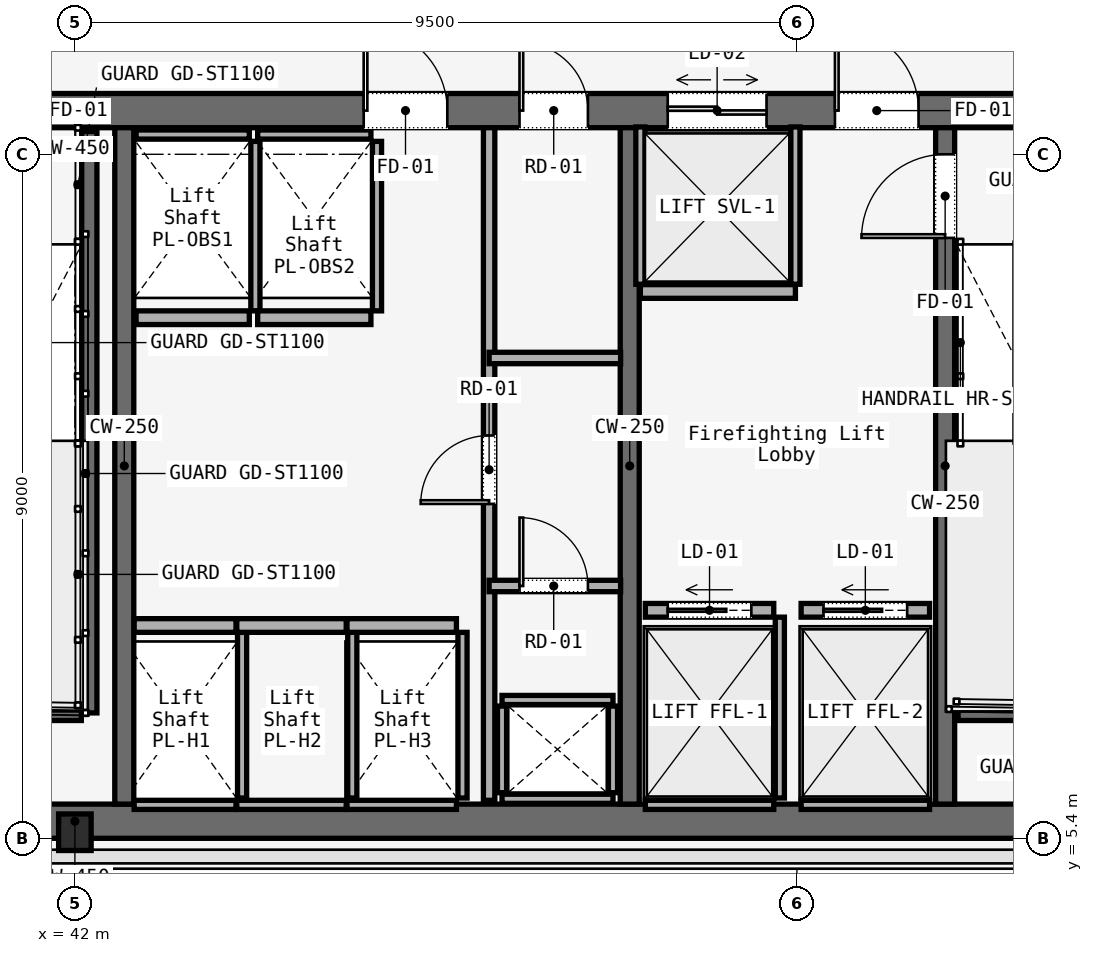
"""IFC4 building model, lengths in metres.
Left out: names, types, materials, properties, quantities, classifications, styles, units other than length and angle.
Written with IfcOpenShell. Run it as: python <this file> out.ifc"""

import sys

from ifc_helpers import new_model, si_unit, direction, frame, frame_2d, origin, origin_2d, place, context, subcontext, project, spatial, rectangle, i_section, extrude, element, fill, save


model = new_model("IFC4")
c1 = context("Model", 3, precision=1e-05, world=origin(), true_north=direction((0.0, 1.0)))
c2 = subcontext(c1, "Body", "Model", "MODEL_VIEW")
j1 = project(units=[si_unit("LENGTHUNIT", "METRE"), si_unit("PLANEANGLEUNIT", "RADIAN")], contexts=[c1])
p1 = place(None, origin())
s1 = spatial("IfcSite", under=j1, at=p1, CompositionType="ELEMENT")
p2 = place(p1, origin())
s2 = spatial("IfcBuilding", under=s1, at=p2, CompositionType="ELEMENT")
p3 = place(p2, frame((0.0, 0.0, 149.8)))
s3 = spatial("IfcBuildingStorey", under=s2, at=p3, CompositionType="ELEMENT", Elevation=149.8)
p4 = place(p3, frame((26.45, 14.975, 0.0), z_axis=(0.0, 0.0, 1.0), x_axis=(1.0, 0.0, 0.0)))
e1 = element("IfcWall", 1, at=p4, inside=s3, PredefinedType="SOLIDWALL", context=c2, shape_type="SweptSolid", body=[
    extrude(rectangle(XDim=31.1, YDim=0.45, at=frame_2d((15.55, 0.0))), origin(), (0.0, 0.0, 1.0), 3.58),
])
p5 = place(p4, frame((1.65, 0.0, 0.0)))
e2 = element("IfcOpeningElement", 2, at=p5, cuts=e1, PredefinedType="OPENING", context=c2, shape_type="SweptSolid", body=[
    extrude(rectangle(XDim=1.1, YDim=2.2, at=frame_2d((0.55, 1.1))), frame((0.0, 0.225, 0.0), z_axis=(0.0, -1.0, 0.0), x_axis=(1.0, 0.0, 0.0)), (0.0, 0.0, 1.0), 0.45),
])
p6 = place(p4, frame((13.65, 0.0, 0.0)))
e3 = element("IfcOpeningElement", 3, at=p6, cuts=e1, PredefinedType="OPENING", context=c2, shape_type="SweptSolid", body=[
    extrude(rectangle(XDim=1.1, YDim=2.2, at=frame_2d((0.55, 1.1))), frame((0.0, 0.225, 0.0), z_axis=(0.0, -1.0, 0.0), x_axis=(1.0, 0.0, 0.0)), (0.0, 0.0, 1.0), 0.45),
])
p7 = place(p4, frame((25.55, 0.0, 0.0)))
e4 = element("IfcOpeningElement", 4, at=p7, cuts=e1, PredefinedType="OPENING", context=c2, shape_type="SweptSolid", body=[
    extrude(rectangle(XDim=1.1, YDim=2.2, at=frame_2d((0.55, 1.1))), frame((0.0, 0.225, 0.0), z_axis=(0.0, -1.0, 0.0), x_axis=(1.0, 0.0, 0.0)), (0.0, 0.0, 1.0), 0.45),
])
p8 = place(p4, frame((10.7, 0.0, 0.0)))
e5 = element("IfcOpeningElement", 5, at=p8, cuts=e1, PredefinedType="OPENING", context=c2, shape_type="SweptSolid", body=[
    extrude(rectangle(XDim=1.4, YDim=2.2, at=frame_2d((0.7, 1.1))), frame((0.0, 0.225, 0.0), z_axis=(0.0, -1.0, 0.0), x_axis=(1.0, 0.0, 0.0)), (0.0, 0.0, 1.0), 0.45),
])
p9 = place(p4, frame((19.35, 0.0, 0.0)))
e6 = element("IfcOpeningElement", 6, at=p9, cuts=e1, PredefinedType="OPENING", context=c2, shape_type="SweptSolid", body=[
    extrude(rectangle(XDim=1.1, YDim=2.2, at=frame_2d((0.55, 1.1))), frame((0.0, 0.225, 0.0), z_axis=(0.0, -1.0, 0.0), x_axis=(1.0, 0.0, 0.0)), (0.0, 0.0, 1.0), 0.45),
])
p10 = place(p4, frame((21.4, 0.0, 0.0)))
e7 = element("IfcOpeningElement", 7, at=p10, cuts=e1, PredefinedType="OPENING", context=c2, shape_type="SweptSolid", body=[
    extrude(rectangle(XDim=0.9, YDim=2.1, at=frame_2d((0.45, 1.05))), frame((0.0, 0.225, 0.0), z_axis=(0.0, -1.0, 0.0), x_axis=(1.0, 0.0, 0.0)), (0.0, 0.0, 1.0), 0.45),
])
p11 = place(p4, frame((23.35, 0.0, 0.0)))
e8 = element("IfcOpeningElement", 8, at=p11, cuts=e1, PredefinedType="OPENING", context=c2, shape_type="SweptSolid", body=[
    extrude(rectangle(XDim=1.3, YDim=2.3, at=frame_2d((0.65, 1.15))), frame((0.0, 0.225, 0.0), z_axis=(0.0, -1.0, 0.0), x_axis=(1.0, 0.0, 0.0)), (0.0, 0.0, 1.0), 0.45),
])
p12 = place(p3, frame((26.45, 5.625, 0.0), z_axis=(0.0, 0.0, 1.0), x_axis=(1.0, 0.0, 0.0)))
e9 = element("IfcWall", 9, at=p12, inside=s3, PredefinedType="SOLIDWALL", context=c2, shape_type="SweptSolid", body=[
    extrude(rectangle(XDim=31.1, YDim=0.45, at=frame_2d((15.55, 0.0))), origin(), (0.0, 0.0, 1.0), 3.58),
])
for number, where, z_axis, x_axis in (
    (10, (42.65, 5.85, 0.0), (0.0, 0.0, 1.0), (0.0, 1.0, 0.0)),
    (11, (49.3, 5.85, 0.0), (0.0, 0.0, 1.0), (0.0, 1.0, 0.0)),
):
    element("IfcWall", number, at=place(p3, frame(where, z_axis=z_axis, x_axis=x_axis)), inside=s3, PredefinedType="SOLIDWALL", context=c2, shape_type="SweptSolid", body=[
        extrude(rectangle(XDim=8.9, YDim=0.25, at=frame_2d((4.45, 0.0))), origin(), (0.0, 0.0, 1.0), 3.58),
    ])
p13 = place(p3, frame((53.45, 5.85, 0.0), z_axis=(0.0, 0.0, 1.0), x_axis=(0.0, 1.0, 0.0)))
e12 = element("IfcWall", 12, at=p13, inside=s3, PredefinedType="SOLIDWALL", context=c2, shape_type="SweptSolid", body=[
    extrude(rectangle(XDim=8.9, YDim=0.25, at=frame_2d((4.45, 0.0))), origin(), (0.0, 0.0, 1.0), 3.58),
])
p14 = place(p13, frame((7.45, 0.0, 0.0)))
e13 = element("IfcOpeningElement", 13, at=p14, cuts=e12, PredefinedType="OPENING", context=c2, shape_type="SweptSolid", body=[
    extrude(rectangle(XDim=1.1, YDim=2.2, at=frame_2d((0.55, 1.1))), frame((0.0, 0.125, 0.0), z_axis=(0.0, -1.0, 0.0), x_axis=(1.0, 0.0, 0.0)), (0.0, 0.0, 1.0), 0.25),
])
p15 = place(p3, frame((42.0, 5.48, 0.0), z_axis=(0.0, 0.0, 1.0), x_axis=(1.0, 0.0, 0.0)))
e14 = element("IfcColumn", 14, at=p15, inside=s3, PredefinedType="COLUMN", context=c2, shape_type="SweptSolid", body=[
    extrude(i_section(OverallWidth=0.428, OverallDepth=0.481, WebThickness=0.051, FlangeThickness=0.065, FilletRadius=0.015, at=origin_2d()), origin(), (0.0, 0.0, 1.0), 3.58),
])
p16 = place(p3, frame((42.19, 14.7, 0.0), z_axis=(0.0, 0.0, 1.0), x_axis=(0.0, -1.0, 0.0)))
e15 = element("IfcWall", 15, at=p16, inside=s3, PredefinedType="SOLIDWALL", context=c2, shape_type="SweptSolid", body=[
    extrude(rectangle(XDim=7.65, YDim=0.2, at=frame_2d((3.825, 0.0))), origin(), (0.0, 0.0, 1.0), 3.8),
])
for number, where, z_axis, x_axis in (
    (16, (38.97, 7.05, 0.0), (0.0, 0.0, 1.0), (1.0, 0.0, 0.0)),
    (17, (53.62, 7.05, 0.0), (0.0, 0.0, 1.0), (1.0, 0.0, 0.0)),
):
    element("IfcWall", number, at=place(p3, frame(where, z_axis=z_axis, x_axis=x_axis)), inside=s3, PredefinedType="SOLIDWALL", context=c2, shape_type="SweptSolid", body=[
        extrude(rectangle(XDim=3.115, YDim=0.2, at=frame_2d((1.558, 0.0))), origin(), (0.0, 0.0, 1.0), 3.8),
    ])
for number, where, z_axis, x_axis in (
    (18, (47.62, 5.92, 0.0), (0.0, 0.0, 1.0), (1.0, 0.0, 0.0)),
    (19, (47.62, 7.22, 0.0), (0.0, 0.0, 1.0), (1.0, 0.0, 0.0)),
):
    element("IfcWall", number, at=place(p3, frame(where, z_axis=z_axis, x_axis=x_axis)), inside=s3, PredefinedType="SOLIDWALL", context=c2, shape_type="SweptSolid", body=[
        extrude(rectangle(XDim=1.46, YDim=0.12, at=frame_2d((0.73, 0.0))), origin(), (0.0, 0.0, 1.0), 3.01),
    ])
for number, where, z_axis, x_axis in (
    (20, (47.62, 6.0, 0.0), (0.0, 0.0, 1.0), (0.0, 1.0, 0.0)),
    (21, (49.08, 6.0, 0.0), (0.0, 0.0, 1.0), (0.0, 1.0, 0.0)),
):
    element("IfcWall", number, at=place(p3, frame(where, z_axis=z_axis, x_axis=x_axis)), inside=s3, PredefinedType="SOLIDWALL", context=c2, shape_type="SweptSolid", body=[
        extrude(rectangle(XDim=1.14, YDim=0.12, at=frame_2d((0.57, 0.0))), origin(), (0.0, 0.0, 1.0), 3.01),
    ])
p17 = place(p3, frame((47.45, 5.9, 0.0), z_axis=(0.0, 0.0, 1.0), x_axis=(0.0, 1.0, 0.0)))
e22 = element("IfcWall", 22, at=p17, inside=s3, PredefinedType="PARTITIONING", context=c2, shape_type="SweptSolid", body=[
    extrude(rectangle(XDim=8.85, YDim=0.15, at=frame_2d((4.425, 0.0))), origin(), (0.0, 0.0, 1.0), 3.01),
])
p18 = place(p17, frame((3.9, 0.0, 0.0)))
e23 = element("IfcOpeningElement", 23, at=p18, cuts=e22, PredefinedType="OPENING", context=c2, shape_type="SweptSolid", body=[
    extrude(rectangle(XDim=0.9, YDim=2.1, at=frame_2d((0.45, 1.05))), frame((0.0, 0.075, 0.0), z_axis=(0.0, -1.0, 0.0), x_axis=(1.0, 0.0, 0.0)), (0.0, 0.0, 1.0), 0.15),
])
p19 = place(p3, frame((47.45, 8.72, 0.0), z_axis=(0.0, 0.0, 1.0), x_axis=(1.0, 0.0, 0.0)))
e24 = element("IfcWall", 24, at=p19, inside=s3, PredefinedType="PARTITIONING", context=c2, shape_type="SweptSolid", body=[
    extrude(rectangle(XDim=1.73, YDim=0.15, at=frame_2d((0.865, 0.0))), origin(), (0.0, 0.0, 1.0), 3.01),
])
p20 = place(p19, frame((0.4, 0.0, 0.0)))
e25 = element("IfcOpeningElement", 25, at=p20, cuts=e24, PredefinedType="OPENING", context=c2, shape_type="SweptSolid", body=[
    extrude(rectangle(XDim=0.9, YDim=2.1, at=frame_2d((0.45, 1.05))), frame((0.0, 0.075, 0.0), z_axis=(0.0, -1.0, 0.0), x_axis=(1.0, 0.0, 0.0)), (0.0, 0.0, 1.0), 0.15),
])
p21 = place(p3, frame((47.45, 11.72, 0.0), z_axis=(0.0, 0.0, 1.0), x_axis=(1.0, 0.0, 0.0)))
e26 = element("IfcWall", 26, at=p21, inside=s3, PredefinedType="PARTITIONING", context=c2, shape_type="SweptSolid", body=[
    extrude(rectangle(XDim=1.73, YDim=0.15, at=frame_2d((0.865, 0.0))), origin(), (0.0, 0.0, 1.0), 3.01),
])
p22 = place(p3, frame((42.78, 8.2, 0.0), z_axis=(0.0, 0.0, 1.0), x_axis=(1.0, 0.0, 0.0)))
e27 = element("IfcWall", 27, at=p22, inside=s3, PredefinedType="SOLIDWALL", context=c2, shape_type="SweptSolid", body=[
    extrude(rectangle(XDim=1.34, YDim=0.18, at=frame_2d((0.67, 0.0))), origin(), (0.0, 0.0, 1.0), 3.01),
])
p23 = place(p3, frame((42.78, 5.84, 0.0), z_axis=(0.0, 0.0, 1.0), x_axis=(1.0, 0.0, 0.0)))
e28 = element("IfcWall", 28, at=p23, inside=s3, PredefinedType="SOLIDWALL", context=c2, shape_type="SweptSolid", body=[
    extrude(rectangle(XDim=1.34, YDim=0.12, at=frame_2d((0.67, 0.0))), origin(), (0.0, 0.0, 1.0), 3.01),
])
p24 = place(p3, frame((44.2, 5.93, 0.0), z_axis=(0.0, 0.0, 1.0), x_axis=(0.0, 1.0, 0.0)))
e29 = element("IfcWall", 29, at=p24, inside=s3, PredefinedType="SOLIDWALL", context=c2, shape_type="SweptSolid", body=[
    extrude(rectangle(XDim=2.18, YDim=0.12, at=frame_2d((1.09, 0.0))), origin(), (0.0, 0.0, 1.0), 3.01),
])
p25 = place(p3, frame((44.13, 8.2, 0.0), z_axis=(0.0, 0.0, 1.0), x_axis=(1.0, 0.0, 0.0)))
e30 = element("IfcWall", 30, at=p25, inside=s3, PredefinedType="SOLIDWALL", context=c2, shape_type="SweptSolid", body=[
    extrude(rectangle(XDim=1.44, YDim=0.18, at=frame_2d((0.72, 0.0))), origin(), (0.0, 0.0, 1.0), 3.01),
])
p26 = place(p3, frame((44.13, 5.84, 0.0), z_axis=(0.0, 0.0, 1.0), x_axis=(1.0, 0.0, 0.0)))
e31 = element("IfcWall", 31, at=p26, inside=s3, PredefinedType="SOLIDWALL", context=c2, shape_type="SweptSolid", body=[
    extrude(rectangle(XDim=1.44, YDim=0.12, at=frame_2d((0.72, 0.0))), origin(), (0.0, 0.0, 1.0), 3.01),
])
p27 = place(p3, frame((45.65, 5.93, 0.0), z_axis=(0.0, 0.0, 1.0), x_axis=(0.0, 1.0, 0.0)))
e32 = element("IfcWall", 32, at=p27, inside=s3, PredefinedType="SOLIDWALL", context=c2, shape_type="SweptSolid", body=[
    extrude(rectangle(XDim=2.18, YDim=0.12, at=frame_2d((1.09, 0.0))), origin(), (0.0, 0.0, 1.0), 3.01),
])
p28 = place(p3, frame((45.58, 8.2, 0.0), z_axis=(0.0, 0.0, 1.0), x_axis=(1.0, 0.0, 0.0)))
e33 = element("IfcWall", 33, at=p28, inside=s3, PredefinedType="SOLIDWALL", context=c2, shape_type="SweptSolid", body=[
    extrude(rectangle(XDim=1.44, YDim=0.18, at=frame_2d((0.72, 0.0))), origin(), (0.0, 0.0, 1.0), 3.01),
])
p29 = place(p3, frame((45.58, 5.84, 0.0), z_axis=(0.0, 0.0, 1.0), x_axis=(1.0, 0.0, 0.0)))
e34 = element("IfcWall", 34, at=p29, inside=s3, PredefinedType="SOLIDWALL", context=c2, shape_type="SweptSolid", body=[
    extrude(rectangle(XDim=1.44, YDim=0.12, at=frame_2d((0.72, 0.0))), origin(), (0.0, 0.0, 1.0), 3.01),
])
p30 = place(p3, frame((47.1, 5.93, 0.0), z_axis=(0.0, 0.0, 1.0), x_axis=(0.0, 1.0, 0.0)))
e35 = element("IfcWall", 35, at=p30, inside=s3, PredefinedType="SOLIDWALL", context=c2, shape_type="SweptSolid", body=[
    extrude(rectangle(XDim=2.18, YDim=0.12, at=frame_2d((1.09, 0.0))), origin(), (0.0, 0.0, 1.0), 3.01),
])
p31 = place(p3, frame((42.805, 12.25, 0.0), z_axis=(0.0, 0.0, 1.0), x_axis=(1.0, 0.0, 0.0)))
e36 = element("IfcWall", 36, at=p31, inside=s3, PredefinedType="SOLIDWALL", context=c2, shape_type="SweptSolid", body=[
    extrude(rectangle(XDim=1.49, YDim=0.18, at=frame_2d((0.745, 0.0))), origin(), (0.0, 0.0, 1.0), 3.01),
])
p32 = place(p3, frame((42.805, 14.66, 0.0), z_axis=(0.0, 0.0, 1.0), x_axis=(1.0, 0.0, 0.0)))
e37 = element("IfcWall", 37, at=p32, inside=s3, PredefinedType="SOLIDWALL", context=c2, shape_type="SweptSolid", body=[
    extrude(rectangle(XDim=1.49, YDim=0.12, at=frame_2d((0.745, 0.0))), origin(), (0.0, 0.0, 1.0), 3.01),
])
p33 = place(p3, frame((44.375, 12.34, 0.0), z_axis=(0.0, 0.0, 1.0), x_axis=(0.0, 1.0, 0.0)))
e38 = element("IfcWall", 38, at=p33, inside=s3, PredefinedType="SOLIDWALL", context=c2, shape_type="SweptSolid", body=[
    extrude(rectangle(XDim=2.23, YDim=0.12, at=frame_2d((1.115, 0.0))), origin(), (0.0, 0.0, 1.0), 3.01),
])
p34 = place(p3, frame((44.405, 12.25, 0.0), z_axis=(0.0, 0.0, 1.0), x_axis=(1.0, 0.0, 0.0)))
e39 = element("IfcWall", 39, at=p34, inside=s3, PredefinedType="SOLIDWALL", context=c2, shape_type="SweptSolid", body=[
    extrude(rectangle(XDim=1.49, YDim=0.18, at=frame_2d((0.745, 0.0))), origin(), (0.0, 0.0, 1.0), 3.01),
])
p35 = place(p3, frame((44.405, 14.66, 0.0), z_axis=(0.0, 0.0, 1.0), x_axis=(1.0, 0.0, 0.0)))
e40 = element("IfcWall", 40, at=p35, inside=s3, PredefinedType="SOLIDWALL", context=c2, shape_type="SweptSolid", body=[
    extrude(rectangle(XDim=1.49, YDim=0.12, at=frame_2d((0.745, 0.0))), origin(), (0.0, 0.0, 1.0), 3.01),
])
p36 = place(p3, frame((45.975, 12.34, 0.0), z_axis=(0.0, 0.0, 1.0), x_axis=(0.0, 1.0, 0.0)))
e41 = element("IfcWall", 41, at=p36, inside=s3, PredefinedType="SOLIDWALL", context=c2, shape_type="SweptSolid", body=[
    extrude(rectangle(XDim=2.23, YDim=0.12, at=frame_2d((1.115, 0.0))), origin(), (0.0, 0.0, 1.0), 3.01),
])
p37 = place(p3, frame((49.505, 8.4, 0.0), z_axis=(0.0, 0.0, 1.0), x_axis=(1.0, 0.0, 0.0)))
e42 = element("IfcWall", 42, at=p37, inside=s3, PredefinedType="SOLIDWALL", context=c2, shape_type="SweptSolid", body=[
    extrude(rectangle(XDim=1.69, YDim=0.18, at=frame_2d((0.845, 0.0))), origin(), (0.0, 0.0, 1.0), 3.01),
])
p38 = place(p37, frame((0.295, 0.0, 0.0)))
e43 = element("IfcOpeningElement", 43, at=p38, cuts=e42, PredefinedType="OPENING", context=c2, shape_type="SweptSolid", body=[
    extrude(rectangle(XDim=1.1, YDim=2.2, at=frame_2d((0.55, 1.1))), frame((0.0, 0.09, 0.0), z_axis=(0.0, -1.0, 0.0), x_axis=(1.0, 0.0, 0.0)), (0.0, 0.0, 1.0), 0.18),
])
p39 = place(p3, frame((49.505, 5.84, 0.0), z_axis=(0.0, 0.0, 1.0), x_axis=(1.0, 0.0, 0.0)))
e44 = element("IfcWall", 44, at=p39, inside=s3, PredefinedType="SOLIDWALL", context=c2, shape_type="SweptSolid", body=[
    extrude(rectangle(XDim=1.69, YDim=0.12, at=frame_2d((0.845, 0.0))), origin(), (0.0, 0.0, 1.0), 3.01),
])
p40 = place(p3, frame((51.275, 5.93, 0.0), z_axis=(0.0, 0.0, 1.0), x_axis=(0.0, 1.0, 0.0)))
e45 = element("IfcWall", 45, at=p40, inside=s3, PredefinedType="SOLIDWALL", context=c2, shape_type="SweptSolid", body=[
    extrude(rectangle(XDim=2.38, YDim=0.12, at=frame_2d((1.19, 0.0))), origin(), (0.0, 0.0, 1.0), 3.01),
])
p41 = place(p3, frame((51.555, 8.4, 0.0), z_axis=(0.0, 0.0, 1.0), x_axis=(1.0, 0.0, 0.0)))
e46 = element("IfcWall", 46, at=p41, inside=s3, PredefinedType="SOLIDWALL", context=c2, shape_type="SweptSolid", body=[
    extrude(rectangle(XDim=1.69, YDim=0.18, at=frame_2d((0.845, 0.0))), origin(), (0.0, 0.0, 1.0), 3.01),
])
p42 = place(p41, frame((0.295, 0.0, 0.0)))
e47 = element("IfcOpeningElement", 47, at=p42, cuts=e46, PredefinedType="OPENING", context=c2, shape_type="SweptSolid", body=[
    extrude(rectangle(XDim=1.1, YDim=2.2, at=frame_2d((0.55, 1.1))), frame((0.0, 0.09, 0.0), z_axis=(0.0, -1.0, 0.0), x_axis=(1.0, 0.0, 0.0)), (0.0, 0.0, 1.0), 0.18),
])
p43 = place(p3, frame((51.555, 5.84, 0.0), z_axis=(0.0, 0.0, 1.0), x_axis=(1.0, 0.0, 0.0)))
e48 = element("IfcWall", 48, at=p43, inside=s3, PredefinedType="SOLIDWALL", context=c2, shape_type="SweptSolid", body=[
    extrude(rectangle(XDim=1.69, YDim=0.12, at=frame_2d((0.845, 0.0))), origin(), (0.0, 0.0, 1.0), 3.01),
])
p44 = place(p3, frame((49.44, 12.595, 0.0), z_axis=(0.0, 0.0, 1.0), x_axis=(1.0, 0.0, 0.0)))
e49 = element("IfcWall", 49, at=p44, inside=s3, PredefinedType="SOLIDWALL", context=c2, shape_type="SweptSolid", body=[
    extrude(rectangle(XDim=2.04, YDim=0.18, at=frame_2d((1.02, 0.0))), origin(), (0.0, 0.0, 1.0), 3.01),
])
for number, where, z_axis, x_axis in (
    (50, (49.44, 12.69, 0.0), (0.0, 0.0, 1.0), (0.0, 1.0, 0.0)),
    (51, (51.48, 12.69, 0.0), (0.0, 0.0, 1.0), (0.0, 1.0, 0.0)),
):
    element("IfcWall", number, at=place(p3, frame(where, z_axis=z_axis, x_axis=x_axis)), inside=s3, PredefinedType="SOLIDWALL", context=c2, shape_type="SweptSolid", body=[
        extrude(rectangle(XDim=2.07, YDim=0.12, at=frame_2d((1.035, 0.0))), origin(), (0.0, 0.0, 1.0), 3.01),
    ])
p45 = place(p7, origin())
e52 = element("IfcDoor", 52, at=p45, inside=s3, OperationType="SINGLE_SWING_RIGHT", PredefinedType="DOOR", context=c2, shape_type="SweptSolid", body=[
    extrude(rectangle(XDim=1.1, YDim=2.2, at=frame_2d((0.55, 1.1))), frame((0.0, 0.025, 0.0), z_axis=(0.0, -1.0, 0.0), x_axis=(1.0, 0.0, 0.0)), (0.0, 0.0, 1.0), 0.05),
])
fill(e4, e52)
p46 = place(p9, origin())
e53 = element("IfcDoor", 53, at=p46, inside=s3, OperationType="SINGLE_SWING_LEFT", PredefinedType="DOOR", context=c2, shape_type="SweptSolid", body=[
    extrude(rectangle(XDim=1.1, YDim=2.2, at=frame_2d((0.55, 1.1))), frame((0.0, 0.025, 0.0), z_axis=(0.0, -1.0, 0.0), x_axis=(1.0, 0.0, 0.0)), (0.0, 0.0, 1.0), 0.05),
])
fill(e6, e53)
p47 = place(p10, origin())
e54 = element("IfcDoor", 54, at=p47, inside=s3, OperationType="SINGLE_SWING_LEFT", PredefinedType="DOOR", context=c2, shape_type="SweptSolid", body=[
    extrude(rectangle(XDim=0.9, YDim=2.1, at=frame_2d((0.45, 1.05))), frame((0.0, 0.025, 0.0), z_axis=(0.0, -1.0, 0.0), x_axis=(1.0, 0.0, 0.0)), (0.0, 0.0, 1.0), 0.05),
])
fill(e7, e54)
p48 = place(p14, origin())
e55 = element("IfcDoor", 55, at=p48, inside=s3, OperationType="SINGLE_SWING_LEFT", PredefinedType="DOOR", context=c2, shape_type="SweptSolid", body=[
    extrude(rectangle(XDim=1.1, YDim=2.2, at=frame_2d((0.55, 1.1))), frame((0.0, 0.025, 0.0), z_axis=(0.0, -1.0, 0.0), x_axis=(1.0, 0.0, 0.0)), (0.0, 0.0, 1.0), 0.05),
])
fill(e13, e55)
p49 = place(p18, origin())
e56 = element("IfcDoor", 56, at=p49, inside=s3, OperationType="SINGLE_SWING_LEFT", PredefinedType="DOOR", context=c2, shape_type="SweptSolid", body=[
    extrude(rectangle(XDim=0.9, YDim=2.1, at=frame_2d((0.45, 1.05))), frame((0.0, 0.025, 0.0), z_axis=(0.0, -1.0, 0.0), x_axis=(1.0, 0.0, 0.0)), (0.0, 0.0, 1.0), 0.05),
])
fill(e23, e56)
p50 = place(p20, origin())
e57 = element("IfcDoor", 57, at=p50, inside=s3, OperationType="SINGLE_SWING_RIGHT", PredefinedType="DOOR", context=c2, shape_type="SweptSolid", body=[
    extrude(rectangle(XDim=0.9, YDim=2.1, at=frame_2d((0.45, 1.05))), frame((0.0, 0.025, 0.0), z_axis=(0.0, -1.0, 0.0), x_axis=(1.0, 0.0, 0.0)), (0.0, 0.0, 1.0), 0.05),
])
fill(e25, e57)
p51 = place(p38, origin())
e58 = element("IfcDoor", 58, at=p51, inside=s3, OperationType="SLIDING_TO_LEFT", PredefinedType="DOOR", context=c2, shape_type="SweptSolid", body=[
    extrude(rectangle(XDim=1.1, YDim=2.2, at=frame_2d((0.55, 1.1))), frame((0.0, 0.025, 0.0), z_axis=(0.0, -1.0, 0.0), x_axis=(1.0, 0.0, 0.0)), (0.0, 0.0, 1.0), 0.05),
])
fill(e43, e58)
p52 = place(p42, origin())
e59 = element("IfcDoor", 59, at=p52, inside=s3, OperationType="SLIDING_TO_LEFT", PredefinedType="DOOR", context=c2, shape_type="SweptSolid", body=[
    extrude(rectangle(XDim=1.1, YDim=2.2, at=frame_2d((0.55, 1.1))), frame((0.0, 0.025, 0.0), z_axis=(0.0, -1.0, 0.0), x_axis=(1.0, 0.0, 0.0)), (0.0, 0.0, 1.0), 0.05),
])
fill(e47, e59)
p53 = place(p11, origin())
e60 = element("IfcDoor", 60, at=p53, inside=s3, OperationType="DOUBLE_DOOR_SLIDING", PredefinedType="DOOR", context=c2, shape_type="SweptSolid", body=[
    extrude(rectangle(XDim=1.3, YDim=2.3, at=frame_2d((0.65, 1.15))), frame((0.0, 0.025, 0.0), z_axis=(0.0, -1.0, 0.0), x_axis=(1.0, 0.0, 0.0)), (0.0, 0.0, 1.0), 0.05),
])
fill(e8, e60)
save(model, sys.argv[1])
